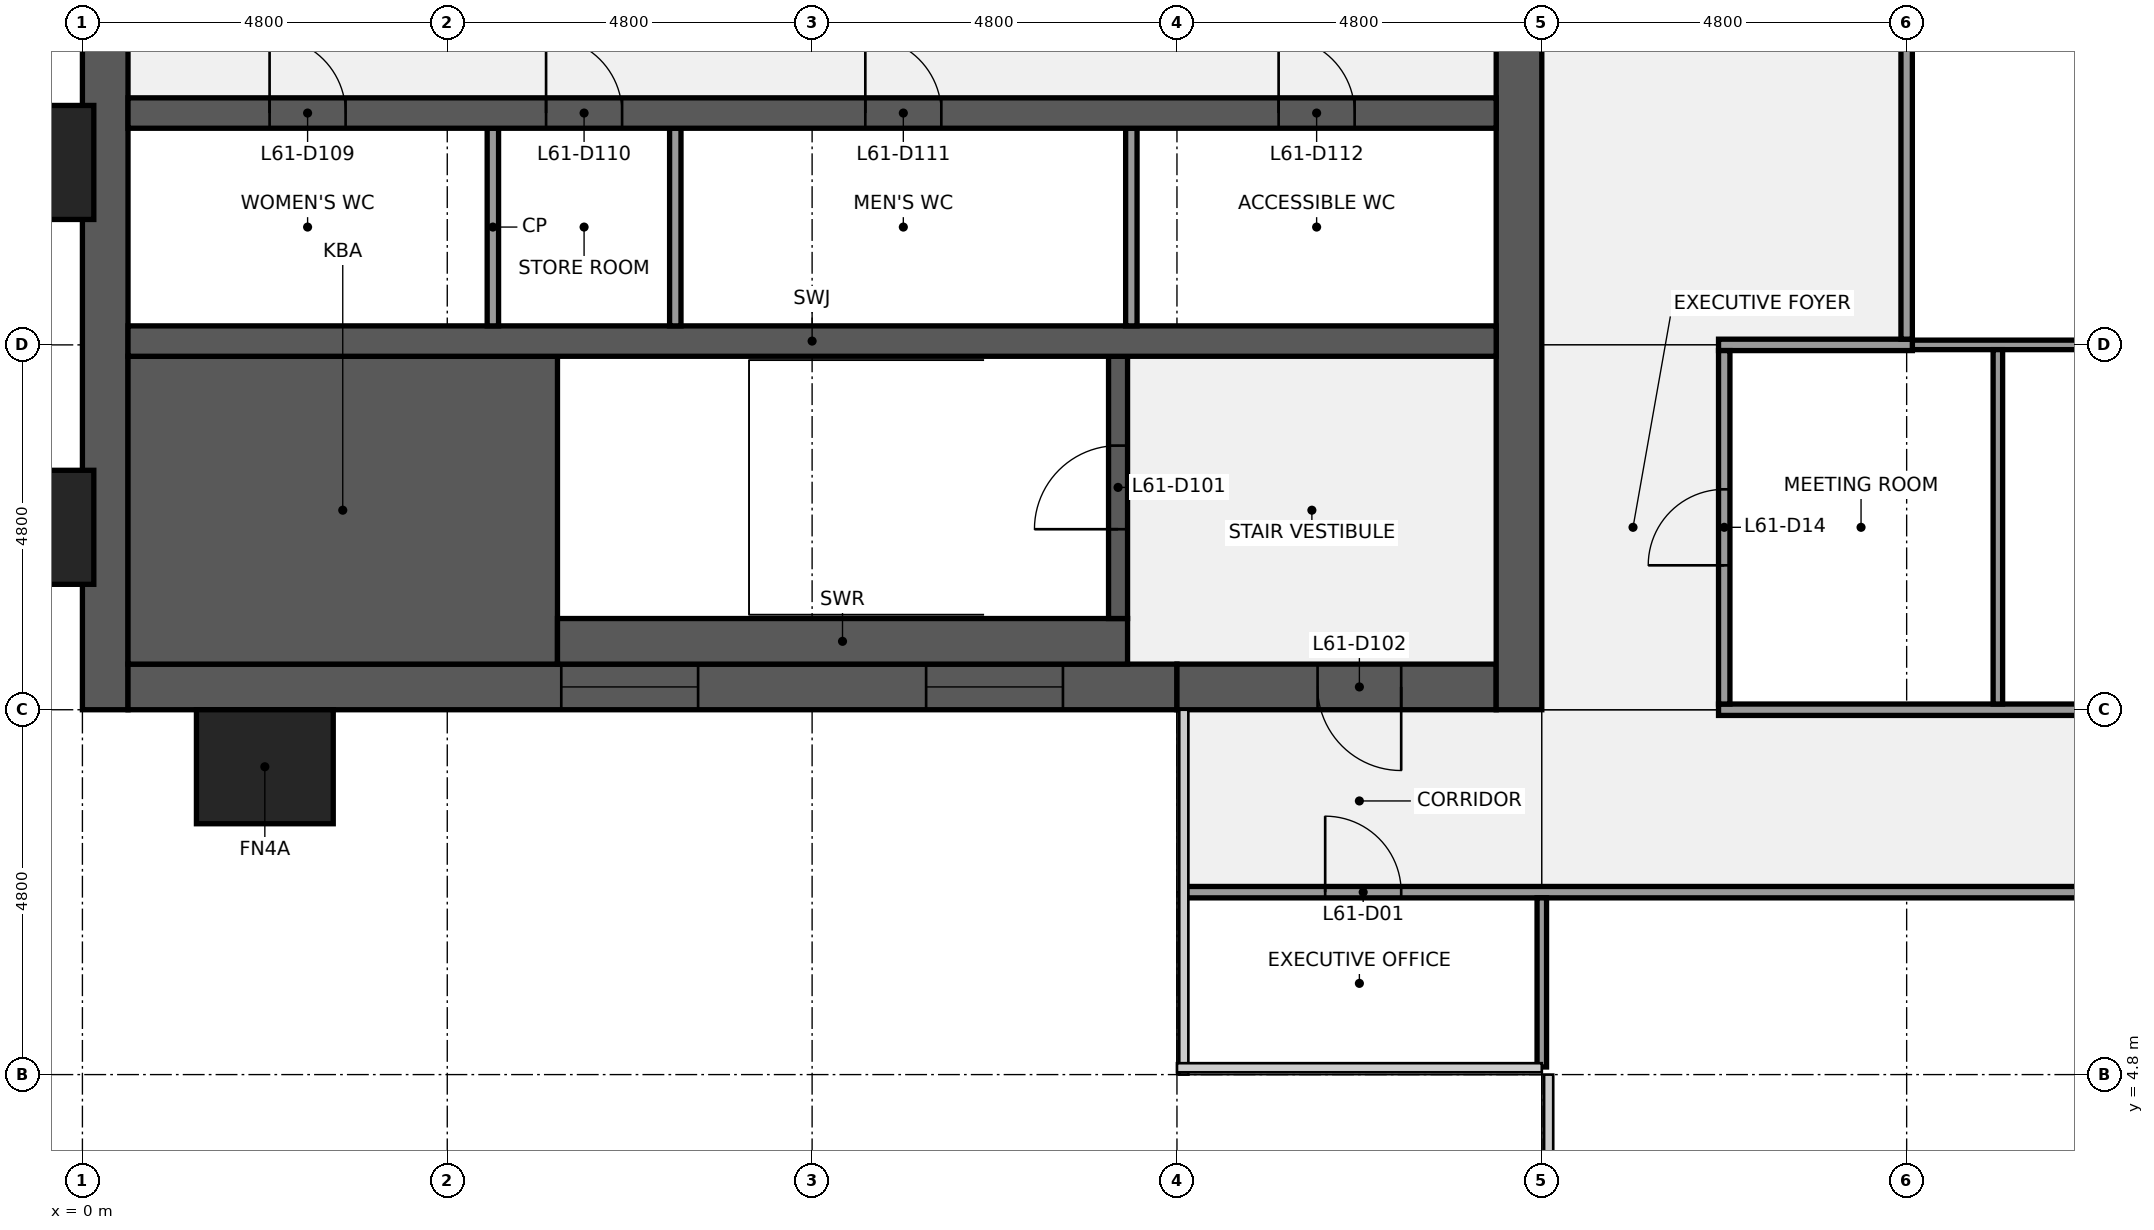
"""IFC4 building model, lengths in metres.
Left out: names, types, materials, properties, quantities, classifications, styles, units other than length and angle.
Written with IfcOpenShell. Run it as: python <this file> out.ifc"""

import sys

from ifc_helpers import new_model, si_unit, direction, frame, frame_2d, origin, origin_2d, place, context, subcontext, project, spatial, rectangle, extrude, element, fill, save


model = new_model("IFC4")
c1 = context("Model", 3, precision=1e-05, world=origin(), true_north=direction((0.0, 1.0)))
c2 = subcontext(c1, "Body", "Model", "MODEL_VIEW")
j1 = project(units=[si_unit("LENGTHUNIT", "METRE"), si_unit("PLANEANGLEUNIT", "RADIAN")], contexts=[c1])
p1 = place(None, origin())
s1 = spatial("IfcSite", under=j1, at=p1, CompositionType="ELEMENT")
p2 = place(p1, origin())
s2 = spatial("IfcBuilding", under=s1, at=p2, CompositionType="ELEMENT")
p3 = place(p2, frame((0.0, 0.0, 282.3)))
s3 = spatial("IfcBuildingStorey", under=s2, at=p3, CompositionType="ELEMENT", Elevation=282.3)
p4 = place(p3, frame((0.3, 9.6, 0.0), z_axis=(0.0, 0.0, 1.0), x_axis=(0.0, 1.0, 0.0)))
e1 = element("IfcWall", 1, at=p4, inside=s3, PredefinedType="SHEAR", context=c2, shape_type="SweptSolid", body=[
    extrude(rectangle(XDim=28.8, YDim=0.6, at=frame_2d((14.4, 0.0))), origin(), (0.0, 0.0, 1.0), 3.84),
])
p5 = place(p4, frame((8.85, 0.0, 0.9)))
e2 = element("IfcOpeningElement", 2, at=p5, cuts=e1, PredefinedType="OPENING", context=c2, shape_type="SweptSolid", body=[
    extrude(rectangle(XDim=1.5, YDim=1.5, at=frame_2d((0.75, 0.75))), frame((0.0, 0.31, 0.0), z_axis=(0.0, -1.0, 0.0), x_axis=(1.0, 0.0, 0.0)), (0.0, 0.0, 1.0), 0.62),
])
p6 = place(p4, frame((18.45, 0.0, 0.9)))
e3 = element("IfcOpeningElement", 3, at=p6, cuts=e1, PredefinedType="OPENING", context=c2, shape_type="SweptSolid", body=[
    extrude(rectangle(XDim=1.5, YDim=1.5, at=frame_2d((0.75, 0.75))), frame((0.0, 0.31, 0.0), z_axis=(0.0, -1.0, 0.0), x_axis=(1.0, 0.0, 0.0)), (0.0, 0.0, 1.0), 0.62),
])
p7 = place(p3, frame((14.4, 9.9, 0.0), z_axis=(0.0, 0.0, 1.0), x_axis=(-1.0, 0.0, 0.0)))
e4 = element("IfcWall", 4, at=p7, inside=s3, PredefinedType="SHEAR", context=c2, shape_type="SweptSolid", body=[
    extrude(rectangle(XDim=13.8, YDim=0.6, at=frame_2d((6.9, 0.0))), origin(), (0.0, 0.0, 1.0), 3.84),
])
p8 = place(p7, frame((6.3, 0.0, 0.9)))
e5 = element("IfcOpeningElement", 5, at=p8, cuts=e4, PredefinedType="OPENING", context=c2, shape_type="SweptSolid", body=[
    extrude(rectangle(XDim=1.8, YDim=1.5, at=frame_2d((0.9, 0.75))), frame((0.0, 0.31, 0.0), z_axis=(0.0, -1.0, 0.0), x_axis=(1.0, 0.0, 0.0)), (0.0, 0.0, 1.0), 0.62),
])
p9 = place(p7, frame((1.5, 0.0, 0.9)))
e6 = element("IfcOpeningElement", 6, at=p9, cuts=e4, PredefinedType="OPENING", context=c2, shape_type="SweptSolid", body=[
    extrude(rectangle(XDim=1.8, YDim=1.5, at=frame_2d((0.9, 0.75))), frame((0.0, 0.31, 0.0), z_axis=(0.0, -1.0, 0.0), x_axis=(1.0, 0.0, 0.0)), (0.0, 0.0, 1.0), 0.62),
])
p10 = place(p3, frame((18.6, 9.9, 0.0), z_axis=(0.0, 0.0, 1.0), x_axis=(-1.0, 0.0, 0.0)))
e7 = element("IfcWall", 7, at=p10, inside=s3, PredefinedType="SHEAR", context=c2, shape_type="SweptSolid", body=[
    extrude(rectangle(XDim=4.2, YDim=0.6, at=frame_2d((2.1, 0.0))), origin(), (0.0, 0.0, 1.0), 3.84),
])
p11 = place(p10, frame((1.25, 0.0, 0.0)))
e8 = element("IfcOpeningElement", 8, at=p11, cuts=e7, PredefinedType="OPENING", context=c2, shape_type="SweptSolid", body=[
    extrude(rectangle(XDim=1.1, YDim=2.1, at=frame_2d((0.55, 1.05))), frame((0.0, 0.31, 0.0), z_axis=(0.0, -1.0, 0.0), x_axis=(1.0, 0.0, 0.0)), (0.0, 0.0, 1.0), 0.62),
])
p12 = place(p3, frame((18.9, 38.4, 0.0), z_axis=(0.0, 0.0, 1.0), x_axis=(0.0, -1.0, 0.0)))
e9 = element("IfcWall", 9, at=p12, inside=s3, PredefinedType="SHEAR", context=c2, shape_type="SweptSolid", body=[
    extrude(rectangle(XDim=28.8, YDim=0.6, at=frame_2d((14.4, 0.0))), origin(), (0.0, 0.0, 1.0), 3.84),
])
p13 = place(p12, frame((18.3, 0.0, 0.0)))
e10 = element("IfcOpeningElement", 10, at=p13, cuts=e9, PredefinedType="OPENING", context=c2, shape_type="SweptSolid", body=[
    extrude(rectangle(XDim=1.8, YDim=2.1, at=frame_2d((0.9, 1.05))), frame((0.0, 0.31, 0.0), z_axis=(0.0, -1.0, 0.0), x_axis=(1.0, 0.0, 0.0)), (0.0, 0.0, 1.0), 0.62),
])
p14 = place(p12, frame((8.7, 0.0, 0.0)))
e11 = element("IfcOpeningElement", 11, at=p14, cuts=e9, PredefinedType="OPENING", context=c2, shape_type="SweptSolid", body=[
    extrude(rectangle(XDim=1.8, YDim=2.1, at=frame_2d((0.9, 1.05))), frame((0.0, 0.31, 0.0), z_axis=(0.0, -1.0, 0.0), x_axis=(1.0, 0.0, 0.0)), (0.0, 0.0, 1.0), 0.62),
])
p15 = place(p3, frame((0.6, 12.225, 0.0), z_axis=(0.0, 0.0, 1.0), x_axis=(1.0, 0.0, 0.0)))
e12 = element("IfcWall", 12, at=p15, inside=s3, PredefinedType="SHEAR", context=c2, shape_type="SweptSolid", body=[
    extrude(rectangle(XDim=5.65, YDim=4.05, at=frame_2d((2.825, 0.0))), origin(), (0.0, 0.0, 1.0), 3.84),
])
p16 = place(p3, frame((6.25, 10.5, 0.0), z_axis=(0.0, 0.0, 1.0), x_axis=(1.0, 0.0, 0.0)))
e13 = element("IfcWall", 13, at=p16, inside=s3, PredefinedType="SHEAR", context=c2, shape_type="SweptSolid", body=[
    extrude(rectangle(XDim=7.5, YDim=0.6, at=frame_2d((3.75, 0.0))), origin(), (0.0, 0.0, 1.0), 3.84),
])
p17 = place(p3, frame((13.625, 10.8, 0.0), z_axis=(0.0, 0.0, 1.0), x_axis=(0.0, 1.0, 0.0)))
e14 = element("IfcWall", 14, at=p17, inside=s3, PredefinedType="SHEAR", context=c2, shape_type="SweptSolid", body=[
    extrude(rectangle(XDim=3.45, YDim=0.25, at=frame_2d((1.725, 0.0))), origin(), (0.0, 0.0, 1.0), 3.84),
])
p18 = place(p17, frame((1.175, 0.0, 0.0)))
e15 = element("IfcOpeningElement", 15, at=p18, cuts=e14, PredefinedType="OPENING", context=c2, shape_type="SweptSolid", body=[
    extrude(rectangle(XDim=1.1, YDim=2.1, at=frame_2d((0.55, 1.05))), frame((0.0, 0.135, 0.0), z_axis=(0.0, -1.0, 0.0), x_axis=(1.0, 0.0, 0.0)), (0.0, 0.0, 1.0), 0.27),
])
p19 = place(p3, frame((0.6, 14.45, 0.0), z_axis=(0.0, 0.0, 1.0), x_axis=(1.0, 0.0, 0.0)))
e16 = element("IfcWall", 16, at=p19, inside=s3, PredefinedType="SHEAR", context=c2, shape_type="SweptSolid", body=[
    extrude(rectangle(XDim=18.0, YDim=0.4, at=frame_2d((9.0, 0.0))), origin(), (0.0, 0.0, 1.0), 3.84),
])
for number, where, z_axis, x_axis in (
    (17, (5.4, 14.65, 0.0), (0.0, 0.0, 1.0), (0.0, 1.0, 0.0)),
    (18, (7.8, 14.65, 0.0), (0.0, 0.0, 1.0), (0.0, 1.0, 0.0)),
    (19, (13.8, 14.65, 0.0), (0.0, 0.0, 1.0), (0.0, 1.0, 0.0)),
):
    element("IfcWall", number, at=place(p3, frame(where, z_axis=z_axis, x_axis=x_axis)), inside=s3, PredefinedType="PARTITIONING", context=c2, shape_type="SweptSolid", body=[
        extrude(rectangle(XDim=2.6, YDim=0.15, at=frame_2d((1.3, 0.0))), origin(), (0.0, 0.0, 1.0), 3.84),
    ])
p20 = place(p3, frame((0.6, 17.45, 0.0), z_axis=(0.0, 0.0, 1.0), x_axis=(1.0, 0.0, 0.0)))
e20 = element("IfcWall", 20, at=p20, inside=s3, PredefinedType="SHEAR", context=c2, shape_type="SweptSolid", body=[
    extrude(rectangle(XDim=18.0, YDim=0.4, at=frame_2d((9.0, 0.0))), origin(), (0.0, 0.0, 1.0), 3.84),
])
p21 = place(p20, frame((1.863, 0.0, 0.0)))
e21 = element("IfcOpeningElement", 21, at=p21, cuts=e20, PredefinedType="OPENING", context=c2, shape_type="SweptSolid", body=[
    extrude(rectangle(XDim=1.0, YDim=2.1, at=frame_2d((0.5, 1.05))), frame((0.0, 0.21, 0.0), z_axis=(0.0, -1.0, 0.0), x_axis=(1.0, 0.0, 0.0)), (0.0, 0.0, 1.0), 0.42),
])
p22 = place(p20, frame((5.5, 0.0, 0.0)))
e22 = element("IfcOpeningElement", 22, at=p22, cuts=e20, PredefinedType="OPENING", context=c2, shape_type="SweptSolid", body=[
    extrude(rectangle(XDim=1.0, YDim=2.1, at=frame_2d((0.5, 1.05))), frame((0.0, 0.21, 0.0), z_axis=(0.0, -1.0, 0.0), x_axis=(1.0, 0.0, 0.0)), (0.0, 0.0, 1.0), 0.42),
])
p23 = place(p20, frame((9.7, 0.0, 0.0)))
e23 = element("IfcOpeningElement", 23, at=p23, cuts=e20, PredefinedType="OPENING", context=c2, shape_type="SweptSolid", body=[
    extrude(rectangle(XDim=1.0, YDim=2.1, at=frame_2d((0.5, 1.05))), frame((0.0, 0.21, 0.0), z_axis=(0.0, -1.0, 0.0), x_axis=(1.0, 0.0, 0.0)), (0.0, 0.0, 1.0), 0.42),
])
p24 = place(p20, frame((15.137, 0.0, 0.0)))
e24 = element("IfcOpeningElement", 24, at=p24, cuts=e20, PredefinedType="OPENING", context=c2, shape_type="SweptSolid", body=[
    extrude(rectangle(XDim=1.0, YDim=2.1, at=frame_2d((0.5, 1.05))), frame((0.0, 0.21, 0.0), z_axis=(0.0, -1.0, 0.0), x_axis=(1.0, 0.0, 0.0)), (0.0, 0.0, 1.0), 0.42),
])
p25 = place(p3, frame((14.5, 7.2, 0.0), z_axis=(0.0, 0.0, 1.0), x_axis=(1.0, 0.0, 0.0)))
e25 = element("IfcWall", 25, at=p25, inside=s3, PredefinedType="PARTITIONING", context=c2, shape_type="SweptSolid", body=[
    extrude(rectangle(XDim=28.6, YDim=0.15, at=frame_2d((14.3, 0.0))), origin(), (0.0, 0.0, 1.0), 2.87),
])
p26 = place(p25, frame((1.85, 0.0, 0.0)))
e26 = element("IfcOpeningElement", 26, at=p26, cuts=e25, PredefinedType="OPENING", context=c2, shape_type="SweptSolid", body=[
    extrude(rectangle(XDim=1.0, YDim=2.1, at=frame_2d((0.5, 1.05))), frame((0.0, 0.085, 0.0), z_axis=(0.0, -1.0, 0.0), x_axis=(1.0, 0.0, 0.0)), (0.0, 0.0, 1.0), 0.17),
])
p27 = place(p25, frame((13.8, 0.0, 0.0)))
e27 = element("IfcOpeningElement", 27, at=p27, cuts=e25, PredefinedType="OPENING", context=c2, shape_type="SweptSolid", body=[
    extrude(rectangle(XDim=1.0, YDim=2.1, at=frame_2d((0.5, 1.05))), frame((0.0, 0.085, 0.0), z_axis=(0.0, -1.0, 0.0), x_axis=(1.0, 0.0, 0.0)), (0.0, 0.0, 1.0), 0.17),
])
p28 = place(p25, frame((25.75, 0.0, 0.0)))
e28 = element("IfcOpeningElement", 28, at=p28, cuts=e25, PredefinedType="OPENING", context=c2, shape_type="SweptSolid", body=[
    extrude(rectangle(XDim=1.0, YDim=2.1, at=frame_2d((0.5, 1.05))), frame((0.0, 0.085, 0.0), z_axis=(0.0, -1.0, 0.0), x_axis=(1.0, 0.0, 0.0)), (0.0, 0.0, 1.0), 0.17),
])
p29 = place(p3, frame((21.525, 9.6, 0.0), z_axis=(0.0, 0.0, 1.0), x_axis=(1.0, 0.0, 0.0)))
e29 = element("IfcWall", 29, at=p29, inside=s3, PredefinedType="PARTITIONING", context=c2, shape_type="SweptSolid", body=[
    extrude(rectangle(XDim=14.55, YDim=0.15, at=frame_2d((7.275, 0.0))), origin(), (0.0, 0.0, 1.0), 2.87),
])
p30 = place(p29, frame((6.775, 0.0, 0.0)))
e30 = element("IfcOpeningElement", 30, at=p30, cuts=e29, PredefinedType="OPENING", context=c2, shape_type="SweptSolid", body=[
    extrude(rectangle(XDim=1.0, YDim=2.1, at=frame_2d((0.5, 1.05))), frame((0.0, 0.085, 0.0), z_axis=(0.0, -1.0, 0.0), x_axis=(1.0, 0.0, 0.0)), (0.0, 0.0, 1.0), 0.17),
])
p31 = place(p3, frame((24.075, 14.4, 0.0), z_axis=(0.0, 0.0, 1.0), x_axis=(1.0, 0.0, 0.0)))
e31 = element("IfcWall", 31, at=p31, inside=s3, PredefinedType="PARTITIONING", context=c2, shape_type="SweptSolid", body=[
    extrude(rectangle(XDim=9.6, YDim=0.125, at=frame_2d((4.8, 0.0))), origin(), (0.0, 0.0, 1.0), 2.87),
])
p32 = place(p3, frame((21.525, 14.4, 0.0), z_axis=(0.0, 0.0, 1.0), x_axis=(1.0, 0.0, 0.0)))
e32 = element("IfcWall", 32, at=p32, inside=s3, PredefinedType="PARTITIONING", context=c2, shape_type="SweptSolid", body=[
    extrude(rectangle(XDim=2.55, YDim=0.15, at=frame_2d((1.275, 0.0))), origin(), (0.0, 0.0, 1.0), 2.87),
])
p33 = place(p3, frame((19.2, 4.9, 0.0), z_axis=(0.0, 0.0, 1.0), x_axis=(0.0, 1.0, 0.0)))
e33 = element("IfcWall", 33, at=p33, inside=s3, PredefinedType="PARTITIONING", context=c2, shape_type="SweptSolid", body=[
    extrude(rectangle(XDim=2.225, YDim=0.125, at=frame_2d((1.113, 0.0))), origin(), (0.0, 0.0, 1.0), 2.87),
])
p34 = place(p3, frame((21.6, 9.675, 0.0), z_axis=(0.0, 0.0, 1.0), x_axis=(0.0, 1.0, 0.0)))
e34 = element("IfcWall", 34, at=p34, inside=s3, PredefinedType="PARTITIONING", context=c2, shape_type="SweptSolid", body=[
    extrude(rectangle(XDim=4.65, YDim=0.15, at=frame_2d((2.325, 0.0))), origin(), (0.0, 0.0, 1.0), 2.87),
])
p35 = place(p34, frame((1.825, 0.0, 0.0)))
e35 = element("IfcOpeningElement", 35, at=p35, cuts=e34, PredefinedType="OPENING", context=c2, shape_type="SweptSolid", body=[
    extrude(rectangle(XDim=1.0, YDim=2.1, at=frame_2d((0.5, 1.05))), frame((0.0, 0.085, 0.0), z_axis=(0.0, -1.0, 0.0), x_axis=(1.0, 0.0, 0.0)), (0.0, 0.0, 1.0), 0.17),
])
p36 = place(p3, frame((24.0, 14.475, 0.0), z_axis=(0.0, 0.0, 1.0), x_axis=(0.0, 1.0, 0.0)))
e36 = element("IfcWall", 36, at=p36, inside=s3, PredefinedType="PARTITIONING", context=c2, shape_type="SweptSolid", body=[
    extrude(rectangle(XDim=10.65, YDim=0.15, at=frame_2d((5.325, 0.0))), origin(), (0.0, 0.0, 1.0), 2.87),
])
p37 = place(p36, frame((4.825, 0.0, 0.0)))
e37 = element("IfcOpeningElement", 37, at=p37, cuts=e36, PredefinedType="OPENING", context=c2, shape_type="SweptSolid", body=[
    extrude(rectangle(XDim=1.0, YDim=2.1, at=frame_2d((0.5, 1.05))), frame((0.0, 0.085, 0.0), z_axis=(0.0, -1.0, 0.0), x_axis=(1.0, 0.0, 0.0)), (0.0, 0.0, 1.0), 0.17),
])
p38 = place(p3, frame((25.2, 9.675, 0.0), z_axis=(0.0, 0.0, 1.0), x_axis=(0.0, 1.0, 0.0)))
e38 = element("IfcWall", 38, at=p38, inside=s3, PredefinedType="PARTITIONING", context=c2, shape_type="SweptSolid", body=[
    extrude(rectangle(XDim=4.662, YDim=0.125, at=frame_2d((2.331, 0.0))), origin(), (0.0, 0.0, 1.0), 2.87),
])
for number, where, z_axis, x_axis in (
    (39, (-0.75, 12.0, 0.0), (0.0, 0.0, 1.0), (0.0, 1.0, 0.0)),
    (40, (-0.75, 16.8, 0.0), (0.0, 0.0, 1.0), (0.0, 1.0, 0.0)),
    (41, (2.4, 8.85, 0.0), (0.0, 0.0, 1.0), (1.0, 0.0, 0.0)),
):
    element("IfcColumn", number, at=place(p3, frame(where, z_axis=z_axis, x_axis=x_axis)), inside=s3, PredefinedType="PILASTER", context=c2, shape_type="SweptSolid", body=[
        extrude(rectangle(XDim=1.8, YDim=1.5, at=origin_2d()), origin(), (0.0, 0.0, 1.0), 4.0),
    ])
p39 = place(p18, origin())
e42 = element("IfcDoor", 42, at=p39, inside=s3, OperationType="SINGLE_SWING_LEFT", PredefinedType="DOOR", context=c2, shape_type="SweptSolid", body=[
    extrude(rectangle(XDim=1.1, YDim=2.1, at=frame_2d((0.55, 1.05))), frame((0.0, 0.025, 0.0), z_axis=(0.0, -1.0, 0.0), x_axis=(1.0, 0.0, 0.0)), (0.0, 0.0, 1.0), 0.05),
])
fill(e15, e42)
p40 = place(p11, origin())
e43 = element("IfcDoor", 43, at=p40, inside=s3, OperationType="SINGLE_SWING_LEFT", PredefinedType="DOOR", context=c2, shape_type="SweptSolid", body=[
    extrude(rectangle(XDim=1.1, YDim=2.1, at=frame_2d((0.55, 1.05))), frame((0.0, 0.025, 0.0), z_axis=(0.0, -1.0, 0.0), x_axis=(1.0, 0.0, 0.0)), (0.0, 0.0, 1.0), 0.05),
])
fill(e8, e43)
p41 = place(p21, origin())
e44 = element("IfcDoor", 44, at=p41, inside=s3, OperationType="SINGLE_SWING_LEFT", PredefinedType="DOOR", context=c2, shape_type="SweptSolid", body=[
    extrude(rectangle(XDim=1.0, YDim=2.1, at=frame_2d((0.5, 1.05))), frame((0.0, 0.025, 0.0), z_axis=(0.0, -1.0, 0.0), x_axis=(1.0, 0.0, 0.0)), (0.0, 0.0, 1.0), 0.05),
])
fill(e21, e44)
p42 = place(p22, origin())
e45 = element("IfcDoor", 45, at=p42, inside=s3, OperationType="SINGLE_SWING_LEFT", PredefinedType="DOOR", context=c2, shape_type="SweptSolid", body=[
    extrude(rectangle(XDim=1.0, YDim=2.1, at=frame_2d((0.5, 1.05))), frame((0.0, 0.025, 0.0), z_axis=(0.0, -1.0, 0.0), x_axis=(1.0, 0.0, 0.0)), (0.0, 0.0, 1.0), 0.05),
])
fill(e22, e45)
p43 = place(p23, origin())
e46 = element("IfcDoor", 46, at=p43, inside=s3, OperationType="SINGLE_SWING_LEFT", PredefinedType="DOOR", context=c2, shape_type="SweptSolid", body=[
    extrude(rectangle(XDim=1.0, YDim=2.1, at=frame_2d((0.5, 1.05))), frame((0.0, 0.025, 0.0), z_axis=(0.0, -1.0, 0.0), x_axis=(1.0, 0.0, 0.0)), (0.0, 0.0, 1.0), 0.05),
])
fill(e23, e46)
p44 = place(p24, origin())
e47 = element("IfcDoor", 47, at=p44, inside=s3, OperationType="SINGLE_SWING_LEFT", PredefinedType="DOOR", context=c2, shape_type="SweptSolid", body=[
    extrude(rectangle(XDim=1.0, YDim=2.1, at=frame_2d((0.5, 1.05))), frame((0.0, 0.025, 0.0), z_axis=(0.0, -1.0, 0.0), x_axis=(1.0, 0.0, 0.0)), (0.0, 0.0, 1.0), 0.05),
])
fill(e24, e47)
p45 = place(p8, origin())
e48 = element("IfcWindow", 48, at=p45, inside=s3, PartitioningType="SINGLE_PANEL", PredefinedType="WINDOW", context=c2, shape_type="SweptSolid", body=[
    extrude(rectangle(XDim=1.8, YDim=1.5, at=frame_2d((0.9, 0.75))), frame((0.0, 0.03, 0.0), z_axis=(0.0, -1.0, 0.0), x_axis=(1.0, 0.0, 0.0)), (0.0, 0.0, 1.0), 0.06),
])
fill(e5, e48)
p46 = place(p9, origin())
e49 = element("IfcWindow", 49, at=p46, inside=s3, PartitioningType="SINGLE_PANEL", PredefinedType="WINDOW", context=c2, shape_type="SweptSolid", body=[
    extrude(rectangle(XDim=1.8, YDim=1.5, at=frame_2d((0.9, 0.75))), frame((0.0, 0.03, 0.0), z_axis=(0.0, -1.0, 0.0), x_axis=(1.0, 0.0, 0.0)), (0.0, 0.0, 1.0), 0.06),
])
fill(e6, e49)
p47 = place(p26, origin())
e50 = element("IfcDoor", 50, at=p47, inside=s3, OperationType="SINGLE_SWING_LEFT", PredefinedType="DOOR", context=c2, shape_type="SweptSolid", body=[
    extrude(rectangle(XDim=1.0, YDim=2.1, at=frame_2d((0.5, 1.05))), frame((0.0, 0.025, 0.0), z_axis=(0.0, -1.0, 0.0), x_axis=(1.0, 0.0, 0.0)), (0.0, 0.0, 1.0), 0.05),
])
fill(e26, e50)
p48 = place(p35, origin())
e51 = element("IfcDoor", 51, at=p48, inside=s3, OperationType="SINGLE_SWING_LEFT", PredefinedType="DOOR", context=c2, shape_type="SweptSolid", body=[
    extrude(rectangle(XDim=1.0, YDim=2.1, at=frame_2d((0.5, 1.05))), frame((0.0, 0.025, 0.0), z_axis=(0.0, -1.0, 0.0), x_axis=(1.0, 0.0, 0.0)), (0.0, 0.0, 1.0), 0.05),
])
fill(e35, e51)
save(model, sys.argv[1])
